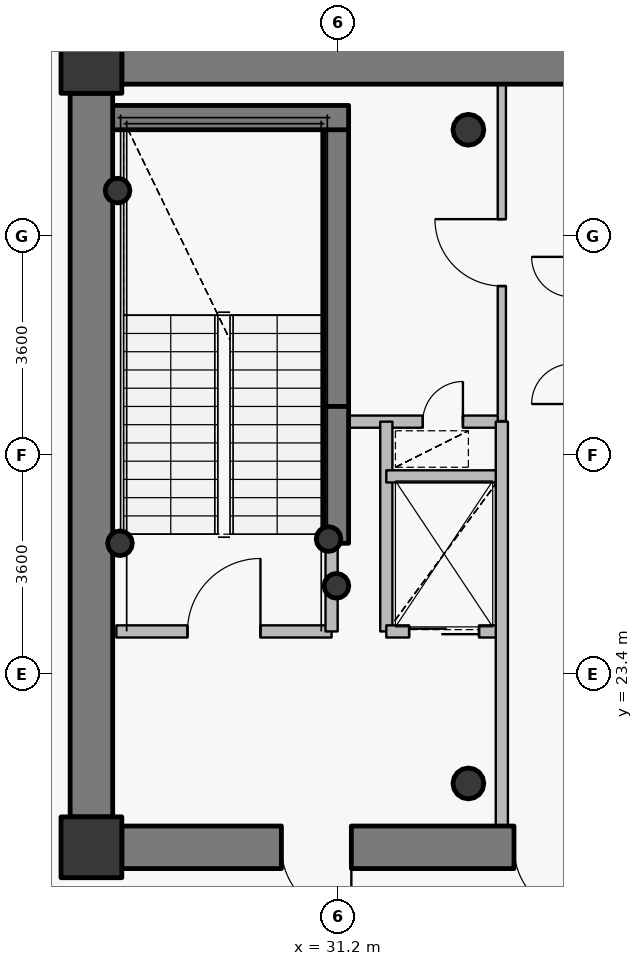
"""IFC4 building model, lengths in metres.
Left out: names, types, materials, properties, quantities, classifications, styles, units other than length and angle.
Written with IfcOpenShell. Run it as: python <this file> out.ifc"""

import sys

from ifc_helpers import new_model, si_unit, direction, frame, frame_2d, origin, origin_2d, place, context, subcontext, project, spatial, rectangle, hollow_circle, extrude, source, transform, mapped, element, fill, save


model = new_model("IFC4")
c1 = context("Model", 3, precision=1e-05, world=origin(), true_north=direction((0.0, 1.0)))
c2 = subcontext(c1, "Body", "Model", "MODEL_VIEW")
j1 = project(units=[si_unit("LENGTHUNIT", "METRE"), si_unit("PLANEANGLEUNIT", "RADIAN")], contexts=[c1])
p1 = place(None, origin())
s1 = spatial("IfcSite", under=j1, at=p1, CompositionType="ELEMENT")
p2 = place(p1, origin())
s2 = spatial("IfcBuilding", under=s1, at=p2, CompositionType="ELEMENT")
p3 = place(p2, frame((0.0, 0.0, 306.75)))
s3 = spatial("IfcBuildingStorey", under=s2, at=p3, CompositionType="ELEMENT", Elevation=306.75)
for number, where, z_axis, x_axis in (
    (1, (27.15, 20.55, 0.0), (0.0, 0.0, 1.0), (1.0, 0.0, 0.0)),
    (2, (27.15, 33.45, 0.0), (0.0, 0.0, 1.0), (1.0, 0.0, 0.0)),
):
    element("IfcColumn", number, at=place(p3, frame(where, z_axis=z_axis, x_axis=x_axis)), inside=s3, PredefinedType="COLUMN", context=c2, shape_type="SweptSolid", body=[
        extrude(rectangle(XDim=1.0, YDim=1.0, at=origin_2d()), origin(), (0.0, 0.0, 1.0), 3.75),
    ])
for number, where, z_axis, x_axis in (
    (3, (33.35, 21.6, 0.0), (0.0, 0.0, 1.0), (1.0, 0.0, 0.0)),
    (4, (33.35, 32.35, 0.0), (0.0, 0.0, 1.0), (1.0, 0.0, 0.0)),
):
    element("IfcColumn", number, at=place(p3, frame(where, z_axis=z_axis, x_axis=x_axis)), inside=s3, PredefinedType="COLUMN", context=c2, shape_type="SweptSolid", body=[
        extrude(hollow_circle(Radius=0.254, WallThickness=0.02, at=origin_2d()), origin(), (0.0, 0.0, 1.0), 3.75),
    ])
p4 = place(p3, frame((31.18, 27.8, 0.0), z_axis=(0.0, 0.0, 1.0), x_axis=(0.0, 1.0, 0.0)))
e5 = element("IfcWall", 5, at=p4, inside=s3, PredefinedType="SHEAR", context=c2, shape_type="SweptSolid", body=[
    extrude(rectangle(XDim=4.75, YDim=0.4, at=frame_2d((2.375, 0.0))), origin(), (0.0, 0.0, 1.0), 3.75),
])
p5 = place(p3, frame((27.25, 32.55, 0.0), z_axis=(0.0, 0.0, 1.0), x_axis=(1.0, 0.0, 0.0)))
e6 = element("IfcWall", 6, at=p5, inside=s3, PredefinedType="SHEAR", context=c2, shape_type="SweptSolid", body=[
    extrude(rectangle(XDim=4.13, YDim=0.4, at=frame_2d((2.065, 0.0))), origin(), (0.0, 0.0, 1.0), 3.75),
])
for number, where, z_axis, x_axis in (
    (7, (27.58, 31.35, 0.0), (0.0, 0.0, 1.0), (1.0, 0.0, 0.0)),
    (8, (31.05, 25.62, 0.0), (0.0, 0.0, 1.0), (1.0, 0.0, 0.0)),
    (9, (31.18, 24.85, 0.0), (0.0, 0.0, 1.0), (1.0, 0.0, 0.0)),
    (10, (27.62, 25.55, 0.0), (0.0, 0.0, 1.0), (1.0, 0.0, 0.0)),
):
    element("IfcColumn", number, at=place(p3, frame(where, z_axis=z_axis, x_axis=x_axis)), inside=s3, PredefinedType="COLUMN", context=c2, shape_type="SweptSolid", body=[
        extrude(hollow_circle(Radius=0.203, WallThickness=0.016, at=origin_2d()), origin(), (0.0, 0.0, 1.0), 3.75),
    ])
p6 = place(p3, frame((27.65, 33.45, 0.0), z_axis=(0.0, 0.0, 1.0), x_axis=(1.0, 0.0, 0.0)))
e11 = element("IfcWall", 11, at=p6, inside=s3, PredefinedType="SHEAR", context=c2, shape_type="SweptSolid", body=[
    extrude(rectangle(XDim=16.7, YDim=0.7, at=frame_2d((8.35, 0.0))), origin(), (0.0, 0.0, 1.0), 3.05),
])
p7 = place(p6, frame((12.775, 0.0, 0.0)))
e12 = element("IfcOpeningElement", 12, at=p7, cuts=e11, PredefinedType="OPENING", context=c2, shape_type="SweptSolid", body=[
    extrude(rectangle(XDim=1.15, YDim=2.15, at=origin_2d()), frame((0.575, 0.36, 1.075), z_axis=(0.0, -1.0, 0.0), x_axis=(1.0, 0.0, 0.0)), (0.0, 0.0, 1.0), 0.72),
])
p8 = place(p3, frame((44.35, 20.55, 0.0), z_axis=(0.0, 0.0, 1.0), x_axis=(-1.0, 0.0, 0.0)))
e13 = element("IfcWall", 13, at=p8, inside=s3, PredefinedType="SHEAR", context=c2, shape_type="SweptSolid", body=[
    extrude(rectangle(XDim=16.7, YDim=0.7, at=frame_2d((8.35, 0.0))), origin(), (0.0, 0.0, 1.0), 3.05),
])
p9 = place(p8, frame((12.925, 0.0, 0.0)))
e14 = element("IfcOpeningElement", 14, at=p9, cuts=e13, PredefinedType="OPENING", context=c2, shape_type="SweptSolid", body=[
    extrude(rectangle(XDim=1.15, YDim=2.15, at=origin_2d()), frame((0.575, 0.36, 1.075), z_axis=(0.0, -1.0, 0.0), x_axis=(1.0, 0.0, 0.0)), (0.0, 0.0, 1.0), 0.72),
])
p10 = place(p8, frame((9.1, 0.0, 0.0)))
e15 = element("IfcOpeningElement", 15, at=p10, cuts=e13, PredefinedType="OPENING", context=c2, shape_type="SweptSolid", body=[
    extrude(rectangle(XDim=1.15, YDim=2.15, at=origin_2d()), frame((0.575, 0.36, 1.075), z_axis=(0.0, -1.0, 0.0), x_axis=(1.0, 0.0, 0.0)), (0.0, 0.0, 1.0), 0.72),
])
p11 = place(p3, frame((27.15, 21.05, 0.0), z_axis=(0.0, 0.0, 1.0), x_axis=(0.0, 1.0, 0.0)))
e16 = element("IfcWall", 16, at=p11, inside=s3, PredefinedType="SHEAR", context=c2, shape_type="SweptSolid", body=[
    extrude(rectangle(XDim=11.9, YDim=0.7, at=frame_2d((5.95, 0.0))), origin(), (0.0, 0.0, 1.0), 3.05),
])
p12 = place(p3, frame((31.18, 25.55, 0.0), z_axis=(0.0, 0.0, 1.0), x_axis=(0.0, 1.0, 0.0)))
e17 = element("IfcWall", 17, at=p12, inside=s3, PredefinedType="SHEAR", context=c2, shape_type="SweptSolid", body=[
    extrude(rectangle(XDim=2.25, YDim=0.4, at=frame_2d((1.125, 0.0))), origin(), (0.0, 0.0, 1.0), 3.1),
])
p13 = place(p3, frame((27.56, 24.1, 0.0), z_axis=(0.0, 0.0, 1.0), x_axis=(1.0, 0.0, 0.0)))
e18 = element("IfcWall", 18, at=p13, inside=s3, PredefinedType="PARTITIONING", context=c2, shape_type="SweptSolid", body=[
    extrude(rectangle(XDim=3.54, YDim=0.2, at=frame_2d((1.77, 0.0))), origin(), (0.0, 0.0, 1.0), 3.5),
])
p14 = place(p13, frame((1.17, 0.0, 0.0)))
e19 = element("IfcOpeningElement", 19, at=p14, cuts=e18, PredefinedType="OPENING", context=c2, shape_type="SweptSolid", body=[
    extrude(rectangle(XDim=1.2, YDim=2.15, at=origin_2d()), frame((0.6, 0.11, 1.075), z_axis=(0.0, -1.0, 0.0), x_axis=(1.0, 0.0, 0.0)), (0.0, 0.0, 1.0), 0.22),
])
p15 = place(p3, frame((31.1, 24.1, 0.0), z_axis=(0.0, 0.0, 1.0), x_axis=(0.0, 1.0, 0.0)))
e20 = element("IfcWall", 20, at=p15, inside=s3, PredefinedType="PARTITIONING", context=c2, shape_type="SweptSolid", body=[
    extrude(rectangle(XDim=1.44, YDim=0.2, at=frame_2d((0.72, 0.0))), origin(), (0.0, 0.0, 1.0), 3.5),
])
p16 = place(p3, frame((31.1, 27.55, 0.0), z_axis=(0.0, 0.0, 1.0), x_axis=(1.0, 0.0, 0.0)))
e21 = element("IfcWall", 21, at=p16, inside=s3, PredefinedType="PARTITIONING", context=c2, shape_type="SweptSolid", body=[
    extrude(rectangle(XDim=2.8, YDim=0.2, at=frame_2d((1.4, 0.0))), origin(), (0.0, 0.0, 1.0), 3.085),
])
p17 = place(p16, frame((1.5, 0.0, 0.0)))
e22 = element("IfcOpeningElement", 22, at=p17, cuts=e21, PredefinedType="OPENING", context=c2, shape_type="SweptSolid", body=[
    extrude(rectangle(XDim=0.66, YDim=2.05, at=origin_2d()), frame((0.33, 0.11, 1.025), z_axis=(0.0, -1.0, 0.0), x_axis=(1.0, 0.0, 0.0)), (0.0, 0.0, 1.0), 0.22),
])
p18 = place(p3, frame((32.0, 24.1, 0.0), z_axis=(0.0, 0.0, 1.0), x_axis=(0.0, 1.0, 0.0)))
e23 = element("IfcWall", 23, at=p18, inside=s3, PredefinedType="PARTITIONING", context=c2, shape_type="SweptSolid", body=[
    extrude(rectangle(XDim=3.45, YDim=0.2, at=frame_2d((1.725, 0.0))), origin(), (0.0, 0.0, 1.0), 3.5),
])
p19 = place(p3, frame((32.0, 24.1, 0.0), z_axis=(0.0, 0.0, 1.0), x_axis=(1.0, 0.0, 0.0)))
e24 = element("IfcWall", 24, at=p19, inside=s3, PredefinedType="PARTITIONING", context=c2, shape_type="SweptSolid", body=[
    extrude(rectangle(XDim=1.9, YDim=0.2, at=frame_2d((0.95, 0.0))), origin(), (0.0, 0.0, 1.0), 3.085),
])
p20 = place(p19, frame((0.375, 0.0, 0.0)))
e25 = element("IfcOpeningElement", 25, at=p20, cuts=e24, PredefinedType="OPENING", context=c2, shape_type="SweptSolid", body=[
    extrude(rectangle(XDim=1.15, YDim=2.15, at=origin_2d()), frame((0.575, 0.11, 1.075), z_axis=(0.0, -1.0, 0.0), x_axis=(1.0, 0.0, 0.0)), (0.0, 0.0, 1.0), 0.22),
])
p21 = place(p3, frame((32.0, 26.65, 0.0), z_axis=(0.0, 0.0, 1.0), x_axis=(1.0, 0.0, 0.0)))
e26 = element("IfcWall", 26, at=p21, inside=s3, PredefinedType="PARTITIONING", context=c2, shape_type="SweptSolid", body=[
    extrude(rectangle(XDim=1.9, YDim=0.2, at=frame_2d((0.95, 0.0))), origin(), (0.0, 0.0, 1.0), 3.085),
])
p22 = place(p3, frame((33.9, 20.9, 0.0), z_axis=(0.0, 0.0, 1.0), x_axis=(0.0, 1.0, 0.0)))
e27 = element("IfcWall", 27, at=p22, inside=s3, PredefinedType="PARTITIONING", context=c2, shape_type="SweptSolid", body=[
    extrude(rectangle(XDim=6.65, YDim=0.2, at=frame_2d((3.325, 0.0))), origin(), (0.0, 0.0, 1.0), 3.085),
])
p23 = place(p3, frame((33.9, 27.56, 0.0), z_axis=(0.0, 0.0, 1.0), x_axis=(0.0, 1.0, 0.0)))
e28 = element("IfcWall", 28, at=p23, inside=s3, PredefinedType="PARTITIONING", context=c2, shape_type="SweptSolid", body=[
    extrude(rectangle(XDim=5.54, YDim=0.135, at=frame_2d((2.77, 0.0))), origin(), (0.0, 0.0, 1.0), 3.085),
])
p24 = place(p23, frame((2.22, 0.0, 0.0)))
e29 = element("IfcOpeningElement", 29, at=p24, cuts=e28, PredefinedType="OPENING", context=c2, shape_type="SweptSolid", body=[
    extrude(rectangle(XDim=1.1, YDim=2.15, at=origin_2d()), frame((0.55, 0.078, 1.075), z_axis=(0.0, -1.0, 0.0), x_axis=(1.0, 0.0, 0.0)), (0.0, 0.0, 1.0), 0.155),
])
p25 = place(p3, frame((26.8, 33.492, 0.0), z_axis=(0.0, 0.0, 1.0), x_axis=(0.0, -1.0, 0.0)))
e30 = element("IfcWall", 30, at=p25, inside=s3, PredefinedType="PARTITIONING", context=c2, shape_type="SweptSolid", body=[
    extrude(rectangle(XDim=0.532, YDim=0.135, at=frame_2d((0.266, 0.0))), origin(), (0.0, 0.0, 1.0), 3.5),
])
p26 = place(p3, frame((26.8, 21.04, 0.0), z_axis=(0.0, 0.0, 1.0), x_axis=(0.0, -1.0, 0.0)))
e31 = element("IfcWall", 31, at=p26, inside=s3, PredefinedType="PARTITIONING", context=c2, shape_type="SweptSolid", body=[
    extrude(rectangle(XDim=0.84, YDim=0.135, at=frame_2d((0.42, 0.0))), origin(), (0.0, 0.0, 1.0), 3.035),
])
p27 = place(p3, frame((27.107, 20.2, 0.0), z_axis=(0.0, 0.0, 1.0), x_axis=(1.0, 0.0, 0.0)))
e32 = element("IfcWall", 32, at=p27, inside=s3, PredefinedType="PARTITIONING", context=c2, shape_type="SweptSolid", body=[
    extrude(rectangle(XDim=0.532, YDim=0.135, at=frame_2d((0.266, 0.0))), origin(), (0.0, 0.0, 1.0), 3.035),
])
m1 = source(origin(), c2, "Body", "SweptSolid", [
    extrude(rectangle(XDim=1.15, YDim=2.15, at=origin_2d()), frame((0.575, 0.025, 1.075), z_axis=(0.0, -1.0, 0.0), x_axis=(1.0, 0.0, 0.0)), (0.0, 0.0, 1.0), 0.05),
])
p28 = place(p9, origin())
e33 = element("IfcDoor", 33, at=p28, inside=s3, OperationType="SINGLE_SWING_LEFT", PredefinedType="DOOR", context=c2, shape_type="MappedRepresentation", body=[
    mapped(m1, transform((0.0, 0.0, 0.0), x_axis=(1.0, 0.0, 0.0), y_axis=(0.0, 1.0, 0.0), z_axis=(0.0, 0.0, 1.0), scale=1.0)),
])
fill(e14, e33)
p29 = place(p10, origin())
e34 = element("IfcDoor", 34, at=p29, inside=s3, OperationType="SINGLE_SWING_LEFT", PredefinedType="DOOR", context=c2, shape_type="MappedRepresentation", body=[
    mapped(m1, transform((0.0, 0.0, 0.0), x_axis=(1.0, 0.0, 0.0), y_axis=(0.0, 1.0, 0.0), z_axis=(0.0, 0.0, 1.0), scale=1.0)),
])
fill(e15, e34)
m2 = source(origin(), c2, "Body", "SweptSolid", [
    extrude(rectangle(XDim=1.2, YDim=2.15, at=origin_2d()), frame((0.6, 0.025, 1.075), z_axis=(0.0, -1.0, 0.0), x_axis=(1.0, 0.0, 0.0)), (0.0, 0.0, 1.0), 0.05),
])
p30 = place(p14, origin())
e35 = element("IfcDoor", 35, at=p30, inside=s3, OperationType="SINGLE_SWING_RIGHT", PredefinedType="DOOR", context=c2, shape_type="MappedRepresentation", body=[
    mapped(m2, transform((0.0, 0.0, 0.0), x_axis=(1.0, 0.0, 0.0), y_axis=(0.0, 1.0, 0.0), z_axis=(0.0, 0.0, 1.0), scale=1.0)),
])
fill(e19, e35)
m3 = source(origin(), c2, "Body", "SweptSolid", [
    extrude(rectangle(XDim=1.15, YDim=2.15, at=origin_2d()), frame((0.575, 0.025, 1.075), z_axis=(0.0, -1.0, 0.0), x_axis=(1.0, 0.0, 0.0)), (0.0, 0.0, 1.0), 0.05),
])
p31 = place(p20, origin())
e36 = element("IfcDoor", 36, at=p31, inside=s3, OperationType="DOUBLE_DOOR_SLIDING", PredefinedType="USERDEFINED", context=c2, shape_type="MappedRepresentation", body=[
    mapped(m3, transform((0.0, 0.0, 0.0), x_axis=(1.0, 0.0, 0.0), y_axis=(0.0, 1.0, 0.0), z_axis=(0.0, 0.0, 1.0), scale=1.0)),
])
fill(e25, e36)
m4 = source(origin(), c2, "Body", "SweptSolid", [
    extrude(rectangle(XDim=1.1, YDim=2.15, at=origin_2d()), frame((0.55, 0.025, 1.075), z_axis=(0.0, -1.0, 0.0), x_axis=(1.0, 0.0, 0.0)), (0.0, 0.0, 1.0), 0.05),
])
p32 = place(p24, origin())
e37 = element("IfcDoor", 37, at=p32, inside=s3, OperationType="SINGLE_SWING_RIGHT", PredefinedType="DOOR", context=c2, shape_type="MappedRepresentation", body=[
    mapped(m4, transform((0.0, 0.0, 0.0), x_axis=(1.0, 0.0, 0.0), y_axis=(0.0, 1.0, 0.0), z_axis=(0.0, 0.0, 1.0), scale=1.0)),
])
fill(e29, e37)
m5 = source(origin(), c2, "Body", "SweptSolid", [
    extrude(rectangle(XDim=0.66, YDim=2.05, at=origin_2d()), frame((0.33, 0.025, 1.025), z_axis=(0.0, -1.0, 0.0), x_axis=(1.0, 0.0, 0.0)), (0.0, 0.0, 1.0), 0.05),
])
p33 = place(p17, origin())
e38 = element("IfcDoor", 38, at=p33, inside=s3, OperationType="SINGLE_SWING_RIGHT", PredefinedType="USERDEFINED", context=c2, shape_type="MappedRepresentation", body=[
    mapped(m5, transform((0.0, 0.0, 0.0), x_axis=(1.0, 0.0, 0.0), y_axis=(0.0, 1.0, 0.0), z_axis=(0.0, 0.0, 1.0), scale=1.0)),
])
fill(e22, e38)
save(model, sys.argv[1])
